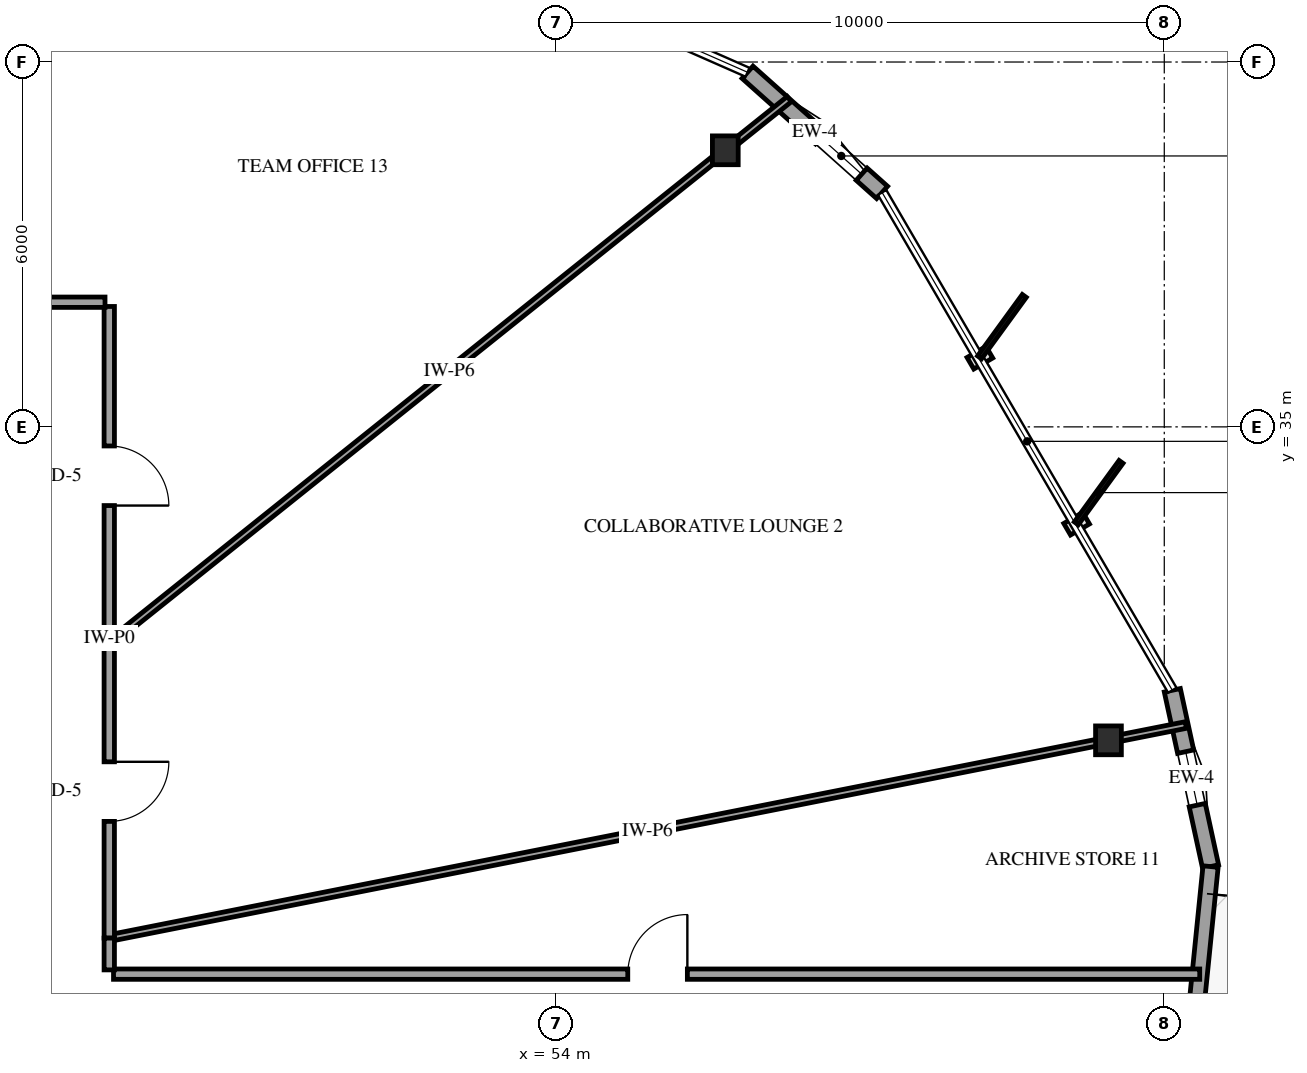
"""IFC4 building model, lengths in metres.
Left out: names, types, materials, properties, quantities, classifications, styles, units other than length and angle.
Written with IfcOpenShell. Run it as: python <this file> out.ifc"""

import sys

from ifc_helpers import new_model, si_unit, direction, frame, frame_2d, origin, origin_2d, place, context, subcontext, project, spatial, rectangle, i_section, extrude, element, fill, save


model = new_model("IFC4")
c1 = context("Model", 3, precision=1e-05, world=origin(), true_north=direction((0.0, 1.0)))
c2 = subcontext(c1, "Body", "Model", "MODEL_VIEW")
j1 = project(units=[si_unit("LENGTHUNIT", "METRE"), si_unit("PLANEANGLEUNIT", "RADIAN")], contexts=[c1])
p1 = place(None, origin())
s1 = spatial("IfcSite", under=j1, at=p1, CompositionType="ELEMENT")
p2 = place(p1, origin())
s2 = spatial("IfcBuilding", under=s1, at=p2, CompositionType="ELEMENT")
p3 = place(p2, frame((0.0, 0.0, 74.6)))
s3 = spatial("IfcBuildingStorey", under=s2, at=p3, CompositionType="ELEMENT", Elevation=74.6)
for number, where, z_axis, x_axis in (
    (1, (63.082, 29.845, 0.0), (0.0, 0.0, 1.0), (1.0, 0.0, 0.0)),
    (2, (56.781, 39.548, 0.0), (0.0, 0.0, 1.0), (1.0, 0.0, 0.0)),
):
    element("IfcColumn", number, at=place(p3, frame(where, z_axis=z_axis, x_axis=x_axis)), inside=s3, PredefinedType="COLUMN", context=c2, shape_type="SweptSolid", body=[
        extrude(i_section(OverallWidth=0.424, OverallDepth=0.474, WebThickness=0.048, FlangeThickness=0.077, FilletRadius=0.038, at=origin_2d()), origin(), (0.0, 0.0, 1.0), 4.0),
    ])
p4 = place(p3, frame((59.36, 38.856, 0.0), z_axis=(0.0, 0.0, 1.0), x_axis=(-0.745968322864, 0.665981427131, 0.0)))
e3 = element("IfcWall", 3, at=p4, inside=s3, PredefinedType="SOLIDWALL", context=c2, shape_type="SweptSolid", body=[
    extrude(rectangle(XDim=2.967, YDim=0.27, at=frame_2d((1.483, 0.0))), origin(), (0.0, 0.0, 1.0), 3.079),
])
p5 = place(p4, frame((0.45, 0.0, 0.75)))
e4 = element("IfcOpeningElement", 4, at=p5, cuts=e3, PredefinedType="OPENING", context=c2, shape_type="SweptSolid", body=[
    extrude(rectangle(XDim=0.9, YDim=1.5, at=frame_2d((0.45, 0.75))), frame((0.0, 0.145, 0.0), z_axis=(0.0, -1.0, 0.0), x_axis=(1.0, 0.0, 0.0)), (0.0, 0.0, 1.0), 0.29),
])
p6 = place(p3, frame((64.761, 27.769, 0.0), z_axis=(0.0, 0.0, 1.0), x_axis=(-0.212012761333, 0.977266897542, 0.0)))
e5 = element("IfcWall", 5, at=p6, inside=s3, PredefinedType="SOLIDWALL", context=c2, shape_type="SweptSolid", body=[
    extrude(rectangle(XDim=2.966, YDim=0.27, at=frame_2d((1.483, 0.0))), origin(), (0.0, 0.0, 1.0), 3.079),
])
p7 = place(p6, frame((1.033, 0.0, 0.75)))
e6 = element("IfcOpeningElement", 6, at=p7, cuts=e5, PredefinedType="OPENING", context=c2, shape_type="SweptSolid", body=[
    extrude(rectangle(XDim=0.9, YDim=1.5, at=frame_2d((0.45, 0.75))), frame((0.0, 0.145, 0.0), z_axis=(0.0, -1.0, 0.0), x_axis=(1.0, 0.0, 0.0)), (0.0, 0.0, 1.0), 0.29),
])
p8 = place(p3, frame((63.81, 18.34, 0.0), z_axis=(0.0, 0.0, 1.0), x_axis=(0.100365790493, 0.994950605859, 0.0)))
e7 = element("IfcWall", 7, at=p8, inside=s3, PredefinedType="SOLIDWALL", context=c2, shape_type="SweptSolid", body=[
    extrude(rectangle(XDim=9.477, YDim=0.25, at=frame_2d((4.739, 0.0))), origin(), (0.0, 0.0, 1.0), 3.079),
])
p9 = place(p8, frame((4.239, 0.0, 0.0)))
e8 = element("IfcOpeningElement", 8, at=p9, cuts=e7, PredefinedType="OPENING", context=c2, shape_type="SweptSolid", body=[
    extrude(rectangle(XDim=1.05, YDim=2.15, at=frame_2d((0.525, 1.075))), frame((0.0, 0.135, 0.0), z_axis=(0.0, -1.0, 0.0), x_axis=(1.0, 0.0, 0.0)), (0.0, 0.0, 1.0), 0.27),
])
p10 = place(p8, frame((0.44, 0.0, 0.72)))
e9 = element("IfcOpeningElement", 9, at=p10, cuts=e7, PredefinedType="OPENING", context=c2, shape_type="SweptSolid", body=[
    extrude(rectangle(XDim=1.05, YDim=1.55, at=frame_2d((0.525, 0.775))), frame((0.0, 0.135, 0.0), z_axis=(0.0, -1.0, 0.0), x_axis=(1.0, 0.0, 0.0)), (0.0, 0.0, 1.0), 0.27),
])
p11 = place(p8, frame((6.1, 0.0, 0.72)))
e10 = element("IfcOpeningElement", 10, at=p11, cuts=e7, PredefinedType="OPENING", context=c2, shape_type="SweptSolid", body=[
    extrude(rectangle(XDim=1.05, YDim=1.55, at=frame_2d((0.525, 0.775))), frame((0.0, 0.135, 0.0), z_axis=(0.0, -1.0, 0.0), x_axis=(1.0, 0.0, 0.0)), (0.0, 0.0, 1.0), 0.27),
])
p12 = place(p3, frame((46.65, 26.593, 0.0), z_axis=(0.0, 0.0, 1.0), x_axis=(0.980974085713, 0.194138721431, 0.0)))
e11 = element("IfcWall", 11, at=p12, inside=s3, PredefinedType="PARTITIONING", context=c2, shape_type="SweptSolid", body=[
    extrude(rectangle(XDim=18.049, YDim=0.11, at=frame_2d((9.024, 0.0))), origin(), (0.0, 0.0, 1.0), 2.995),
])
p13 = place(p3, frame((46.72, 26.0, 0.0), z_axis=(0.0, 0.0, 1.0), x_axis=(1.0, 0.0, 0.0)))
e12 = element("IfcWall", 12, at=p13, inside=s3, PredefinedType="PARTITIONING", context=c2, shape_type="SweptSolid", body=[
    extrude(rectangle(XDim=17.863, YDim=0.17, at=frame_2d((8.932, 0.0))), origin(), (0.0, 0.0, 1.0), 3.7),
])
p14 = place(p13, frame((8.457, 0.0, 0.0)))
e13 = element("IfcOpeningElement", 13, at=p14, cuts=e12, PredefinedType="OPENING", context=c2, shape_type="SweptSolid", body=[
    extrude(rectangle(XDim=0.98, YDim=2.15, at=frame_2d((0.49, 1.075))), frame((0.0, 0.095, 0.0), z_axis=(0.0, -1.0, 0.0), x_axis=(1.0, 0.0, 0.0)), (0.0, 0.0, 1.0), 0.19),
])
p15 = place(p3, frame((46.65, 31.442, 0.0), z_axis=(0.0, 0.0, 1.0), x_axis=(0.780817252488, 0.624759488297, 0.0)))
e14 = element("IfcWall", 14, at=p15, inside=s3, PredefinedType="PARTITIONING", context=c2, shape_type="SweptSolid", body=[
    extrude(rectangle(XDim=14.322, YDim=0.11, at=frame_2d((7.161, 0.0))), origin(), (0.0, 0.0, 1.0), 3.7),
])
p16 = place(p3, frame((43.357, 37.05, 0.0), z_axis=(0.0, 0.0, 1.0), x_axis=(0.367152881948, 0.930160610474, 0.0)))
e15 = element("IfcWall", 15, at=p16, inside=s3, PredefinedType="PARTITIONING", context=c2, shape_type="SweptSolid", body=[
    extrude(rectangle(XDim=8.55, YDim=0.14, at=frame_2d((4.275, 0.0))), origin(), (0.0, 0.0, 1.0), 2.995),
])
p17 = place(p3, frame((46.65, 36.98, 0.0), z_axis=(0.0, 0.0, 1.0), x_axis=(0.0, -1.0, 0.0)))
e16 = element("IfcWall", 16, at=p17, inside=s3, PredefinedType="PARTITIONING", context=c2, shape_type="SweptSolid", body=[
    extrude(rectangle(XDim=5.538, YDim=0.17, at=frame_2d((2.769, 0.0))), origin(), (0.0, 0.0, 1.0), 3.7),
])
p18 = place(p17, frame((2.294, 0.0, 0.0)))
e17 = element("IfcOpeningElement", 17, at=p18, cuts=e16, PredefinedType="OPENING", context=c2, shape_type="SweptSolid", body=[
    extrude(rectangle(XDim=0.98, YDim=2.15, at=frame_2d((0.49, 1.075))), frame((0.0, 0.095, 0.0), z_axis=(0.0, -1.0, 0.0), x_axis=(1.0, 0.0, 0.0)), (0.0, 0.0, 1.0), 0.19),
])
p19 = place(p3, frame((46.65, 31.442, 0.0), z_axis=(0.0, 0.0, 1.0), x_axis=(0.0, -1.0, 0.0)))
e18 = element("IfcWall", 18, at=p19, inside=s3, PredefinedType="PARTITIONING", context=c2, shape_type="SweptSolid", body=[
    extrude(rectangle(XDim=4.849, YDim=0.17, at=frame_2d((2.424, 0.0))), origin(), (0.0, 0.0, 1.0), 3.7),
])
p20 = place(p19, frame((1.95, 0.0, 0.0)))
e19 = element("IfcOpeningElement", 19, at=p20, cuts=e18, PredefinedType="OPENING", context=c2, shape_type="SweptSolid", body=[
    extrude(rectangle(XDim=0.98, YDim=2.15, at=frame_2d((0.49, 1.075))), frame((0.0, 0.095, 0.0), z_axis=(0.0, -1.0, 0.0), x_axis=(1.0, 0.0, 0.0)), (0.0, 0.0, 1.0), 0.19),
])
p21 = place(p3, frame((43.357, 37.05, 0.0), z_axis=(0.0, 0.0, 1.0), x_axis=(1.0, 0.0, 0.0)))
e20 = element("IfcWall", 20, at=p21, inside=s3, PredefinedType="PARTITIONING", context=c2, shape_type="SweptSolid", body=[
    extrude(rectangle(XDim=3.223, YDim=0.17, at=frame_2d((1.612, 0.0))), origin(), (0.0, 0.0, 1.0), 3.7),
])
p22 = place(p3, frame((46.65, 26.593, 0.0), z_axis=(0.0, 0.0, 1.0), x_axis=(0.0, -1.0, 0.0)))
e21 = element("IfcWall", 21, at=p22, inside=s3, PredefinedType="PARTITIONING", context=c2, shape_type="SweptSolid", body=[
    extrude(rectangle(XDim=0.523, YDim=0.17, at=frame_2d((0.261, 0.0))), origin(), (0.0, 0.0, 1.0), 3.7),
])
p23 = place(p5, origin())
e22 = element("IfcWindow", 22, at=p23, inside=s3, PartitioningType="SINGLE_PANEL", PredefinedType="WINDOW", context=c2, shape_type="SweptSolid", body=[
    extrude(rectangle(XDim=0.9, YDim=1.5, at=frame_2d((0.45, 0.75))), frame((0.0, 0.03, 0.0), z_axis=(0.0, -1.0, 0.0), x_axis=(1.0, 0.0, 0.0)), (0.0, 0.0, 1.0), 0.06),
])
fill(e4, e22)
p24 = place(p7, origin())
e23 = element("IfcWindow", 23, at=p24, inside=s3, PartitioningType="SINGLE_PANEL", PredefinedType="WINDOW", context=c2, shape_type="SweptSolid", body=[
    extrude(rectangle(XDim=0.9, YDim=1.5, at=frame_2d((0.45, 0.75))), frame((0.0, 0.03, 0.0), z_axis=(0.0, -1.0, 0.0), x_axis=(1.0, 0.0, 0.0)), (0.0, 0.0, 1.0), 0.06),
])
fill(e6, e23)
p25 = place(p14, origin())
e24 = element("IfcDoor", 24, at=p25, inside=s3, OperationType="SINGLE_SWING_RIGHT", PredefinedType="DOOR", context=c2, shape_type="SweptSolid", body=[
    extrude(rectangle(XDim=0.98, YDim=2.15, at=frame_2d((0.49, 1.075))), frame((0.0, 0.025, 0.0), z_axis=(0.0, -1.0, 0.0), x_axis=(1.0, 0.0, 0.0)), (0.0, 0.0, 1.0), 0.05),
])
fill(e13, e24)
p26 = place(p18, origin())
e25 = element("IfcDoor", 25, at=p26, inside=s3, OperationType="SINGLE_SWING_RIGHT", PredefinedType="DOOR", context=c2, shape_type="SweptSolid", body=[
    extrude(rectangle(XDim=0.98, YDim=2.15, at=frame_2d((0.49, 1.075))), frame((0.0, 0.025, 0.0), z_axis=(0.0, -1.0, 0.0), x_axis=(1.0, 0.0, 0.0)), (0.0, 0.0, 1.0), 0.05),
])
fill(e17, e25)
p27 = place(p20, origin())
e26 = element("IfcDoor", 26, at=p27, inside=s3, OperationType="SINGLE_SWING_LEFT", PredefinedType="DOOR", context=c2, shape_type="SweptSolid", body=[
    extrude(rectangle(XDim=0.98, YDim=2.15, at=frame_2d((0.49, 1.075))), frame((0.0, 0.025, 0.0), z_axis=(0.0, -1.0, 0.0), x_axis=(1.0, 0.0, 0.0)), (0.0, 0.0, 1.0), 0.05),
])
fill(e19, e26)
save(model, sys.argv[1])
